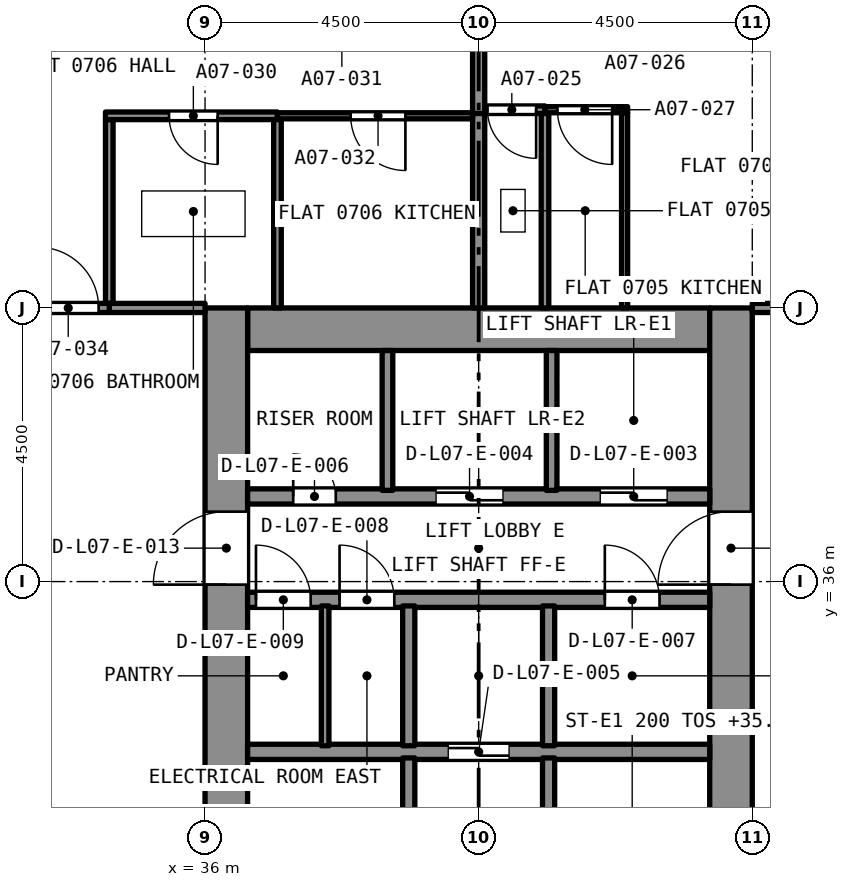
"""IFC4 building model, lengths in metres.
Left out: names, types, materials, properties, quantities, classifications, styles, units other than length and angle.
Written with IfcOpenShell. Run it as: python <this file> out.ifc"""

import sys

from ifc_helpers import new_model, si_unit, direction, frame, frame_2d, origin, place, context, subcontext, project, spatial, rectangle, extrude, element, fill, save


model = new_model("IFC4")
c1 = context("Model", 3, precision=1e-05, world=origin(), true_north=direction((0.0, 1.0)))
c2 = subcontext(c1, "Body", "Model", "MODEL_VIEW")
j1 = project(units=[si_unit("LENGTHUNIT", "METRE"), si_unit("PLANEANGLEUNIT", "RADIAN")], contexts=[c1])
p1 = place(None, origin())
s1 = spatial("IfcSite", under=j1, at=p1, CompositionType="ELEMENT")
p2 = place(p1, origin())
s2 = spatial("IfcBuilding", under=s1, at=p2, CompositionType="ELEMENT")
p3 = place(p2, frame((0.0, 0.0, 33.6)))
s3 = spatial("IfcBuildingStorey", under=s2, at=p3, CompositionType="ELEMENT", Elevation=33.6)
p4 = place(p3, frame((36.7, 40.15, 0.0), z_axis=(0.0, 0.0, 1.0), x_axis=(1.0, 0.0, 0.0)))
e1 = element("IfcWall", 1, at=p4, inside=s3, PredefinedType="SOLIDWALL", context=c2, shape_type="SweptSolid", body=[
    extrude(rectangle(XDim=7.6, YDim=0.7, at=frame_2d((3.8, 0.0))), origin(), (0.0, 0.0, 1.0), 3.2),
])
p5 = place(p3, frame((36.35, 27.0, 0.0), z_axis=(0.0, 0.0, 1.0), x_axis=(0.0, 1.0, 0.0)))
e2 = element("IfcWall", 2, at=p5, inside=s3, PredefinedType="SOLIDWALL", context=c2, shape_type="SweptSolid", body=[
    extrude(rectangle(XDim=13.5, YDim=0.7, at=frame_2d((6.75, 0.0))), origin(), (0.0, 0.0, 1.0), 3.2),
])
p6 = place(p5, frame((8.95, 0.0, 0.0)))
e3 = element("IfcOpeningElement", 3, at=p6, cuts=e2, PredefinedType="OPENING", context=c2, shape_type="SweptSolid", body=[
    extrude(rectangle(XDim=1.2, YDim=2.1, at=frame_2d((0.6, 1.05))), frame((0.0, 0.36, 0.0), z_axis=(0.0, -1.0, 0.0), x_axis=(1.0, 0.0, 0.0)), (0.0, 0.0, 1.0), 0.72),
])
p7 = place(p3, frame((44.65, 27.0, 0.0), z_axis=(0.0, 0.0, 1.0), x_axis=(0.0, 1.0, 0.0)))
e4 = element("IfcWall", 4, at=p7, inside=s3, PredefinedType="SOLIDWALL", context=c2, shape_type="SweptSolid", body=[
    extrude(rectangle(XDim=13.5, YDim=0.7, at=frame_2d((6.75, 0.0))), origin(), (0.0, 0.0, 1.0), 3.2),
])
p8 = place(p7, frame((8.95, 0.0, 0.0)))
e5 = element("IfcOpeningElement", 5, at=p8, cuts=e4, PredefinedType="OPENING", context=c2, shape_type="SweptSolid", body=[
    extrude(rectangle(XDim=1.2, YDim=2.1, at=frame_2d((0.6, 1.05))), frame((0.0, 0.36, 0.0), z_axis=(0.0, -1.0, 0.0), x_axis=(1.0, 0.0, 0.0)), (0.0, 0.0, 1.0), 0.72),
])
p9 = place(p3, frame((41.591, 43.76, 0.0), z_axis=(0.0, 0.0, 1.0), x_axis=(-1.0, 0.0, 0.0)))
e6 = element("IfcWall", 6, at=p9, inside=s3, PredefinedType="PARTITIONING", context=c2, shape_type="SweptSolid", body=[
    extrude(rectangle(XDim=0.991, YDim=0.125, at=frame_2d((0.495, 0.0))), origin(), (0.0, 0.0, 1.0), 2.9),
])
p10 = place(p9, frame((0.146, 0.0, 0.0)))
e7 = element("IfcOpeningElement", 7, at=p10, cuts=e6, PredefinedType="OPENING", context=c2, shape_type="SweptSolid", body=[
    extrude(rectangle(XDim=0.8, YDim=2.1, at=frame_2d((0.4, 1.05))), frame((0.0, 0.073, 0.0), z_axis=(0.0, -1.0, 0.0), x_axis=(1.0, 0.0, 0.0)), (0.0, 0.0, 1.0), 0.145),
])
p11 = place(p3, frame((41.591, 40.5, 0.0), z_axis=(0.0, 0.0, 1.0), x_axis=(0.0, 1.0, 0.0)))
e8 = element("IfcWall", 8, at=p11, inside=s3, PredefinedType="PARTITIONING", context=c2, shape_type="SweptSolid", body=[
    extrude(rectangle(XDim=3.198, YDim=0.125, at=frame_2d((1.599, 0.0))), origin(), (0.0, 0.0, 1.0), 2.9),
])
p12 = place(p3, frame((40.5, 40.5, 0.0), z_axis=(0.0, 0.0, 1.0), x_axis=(0.0, 1.0, 0.0)))
e9 = element("IfcWall", 9, at=p12, inside=s3, PredefinedType="PARTITIONING", context=c2, shape_type="SweptSolid", body=[
    extrude(rectangle(XDim=3.21, YDim=0.2, at=frame_2d((1.605, 0.0))), origin(), (0.0, 0.0, 1.0), 2.9),
])
p13 = place(p3, frame((42.9, 40.5, 0.0), z_axis=(0.0, 0.0, 1.0), x_axis=(0.0, 1.0, 0.0)))
e10 = element("IfcWall", 10, at=p13, inside=s3, PredefinedType="PARTITIONING", context=c2, shape_type="SweptSolid", body=[
    extrude(rectangle(XDim=3.21, YDim=0.1, at=frame_2d((1.605, 0.0))), origin(), (0.0, 0.0, 1.0), 2.9),
])
p14 = place(p3, frame((42.95, 43.76, 0.0), z_axis=(0.0, 0.0, 1.0), x_axis=(-1.0, 0.0, 0.0)))
e11 = element("IfcWall", 11, at=p14, inside=s3, PredefinedType="PARTITIONING", context=c2, shape_type="SweptSolid", body=[
    extrude(rectangle(XDim=1.359, YDim=0.1, at=frame_2d((0.68, 0.0))), origin(), (0.0, 0.0, 1.0), 2.9),
])
p15 = place(p14, frame((0.254, 0.0, 0.0)))
e12 = element("IfcOpeningElement", 12, at=p15, cuts=e11, PredefinedType="OPENING", context=c2, shape_type="SweptSolid", body=[
    extrude(rectangle(XDim=0.9, YDim=2.1, at=frame_2d((0.45, 1.05))), frame((0.0, 0.06, 0.0), z_axis=(0.0, -1.0, 0.0), x_axis=(1.0, 0.0, 0.0)), (0.0, 0.0, 1.0), 0.12),
])
p16 = place(p3, frame((40.5, 43.698, 0.0), z_axis=(0.0, 0.0, 1.0), x_axis=(0.0, 1.0, 0.0)))
e13 = element("IfcWall", 13, at=p16, inside=s3, PredefinedType="PARTITIONING", context=c2, shape_type="SweptSolid", body=[
    extrude(rectangle(XDim=1.292, YDim=0.2, at=frame_2d((0.646, 0.0))), origin(), (0.0, 0.0, 1.0), 2.9),
])
p17 = place(p3, frame((45.0, 40.5, 0.0), z_axis=(0.0, 0.0, 1.0), x_axis=(1.0, 0.0, 0.0)))
e14 = element("IfcWall", 14, at=p17, inside=s3, PredefinedType="PARTITIONING", context=c2, shape_type="SweptSolid", body=[
    extrude(rectangle(XDim=3.8, YDim=0.15, at=frame_2d((1.9, 0.0))), origin(), (0.0, 0.0, 1.0), 2.9),
])
p18 = place(p17, frame((1.75, 0.0, 0.0)))
e15 = element("IfcOpeningElement", 15, at=p18, cuts=e14, PredefinedType="OPENING", context=c2, shape_type="SweptSolid", body=[
    extrude(rectangle(XDim=1.0, YDim=2.1, at=frame_2d((0.5, 1.05))), frame((0.0, 0.085, 0.0), z_axis=(0.0, -1.0, 0.0), x_axis=(1.0, 0.0, 0.0)), (0.0, 0.0, 1.0), 0.17),
])
p19 = place(p3, frame((34.425, 40.575, 0.0), z_axis=(0.0, 0.0, 1.0), x_axis=(0.0, 1.0, 0.0)))
e16 = element("IfcWall", 16, at=p19, inside=s3, PredefinedType="PARTITIONING", context=c2, shape_type="SweptSolid", body=[
    extrude(rectangle(XDim=3.022, YDim=0.125, at=frame_2d((1.511, 0.0))), origin(), (0.0, 0.0, 1.0), 2.9),
])
p20 = place(p3, frame((37.19, 43.66, 0.0), z_axis=(0.0, 0.0, 1.0), x_axis=(-1.0, 0.0, 0.0)))
e17 = element("IfcWall", 17, at=p20, inside=s3, PredefinedType="PARTITIONING", context=c2, shape_type="SweptSolid", body=[
    extrude(rectangle(XDim=2.828, YDim=0.125, at=frame_2d((1.414, 0.0))), origin(), (0.0, 0.0, 1.0), 2.9),
])
p21 = place(p20, frame((0.983, 0.0, 0.0)))
e18 = element("IfcOpeningElement", 18, at=p21, cuts=e17, PredefinedType="OPENING", context=c2, shape_type="SweptSolid", body=[
    extrude(rectangle(XDim=0.8, YDim=2.1, at=frame_2d((0.4, 1.05))), frame((0.0, 0.073, 0.0), z_axis=(0.0, -1.0, 0.0), x_axis=(1.0, 0.0, 0.0)), (0.0, 0.0, 1.0), 0.145),
])
p22 = place(p3, frame((37.191, 40.5, 0.0), z_axis=(0.0, 0.0, 1.0), x_axis=(0.0, 1.0, 0.0)))
e19 = element("IfcWall", 19, at=p22, inside=s3, PredefinedType="PARTITIONING", context=c2, shape_type="SweptSolid", body=[
    extrude(rectangle(XDim=3.097, YDim=0.125, at=frame_2d((1.549, 0.0))), origin(), (0.0, 0.0, 1.0), 2.9),
])
p23 = place(p3, frame((34.425, 40.5, 0.0), z_axis=(0.0, 0.0, 1.0), x_axis=(1.0, 0.0, 0.0)))
e20 = element("IfcWall", 20, at=p23, inside=s3, PredefinedType="PARTITIONING", context=c2, shape_type="SweptSolid", body=[
    extrude(rectangle(XDim=1.575, YDim=0.15, at=frame_2d((0.788, 0.0))), origin(), (0.0, 0.0, 1.0), 2.9),
])
p24 = place(p3, frame((40.4, 43.66, 0.0), z_axis=(0.0, 0.0, 1.0), x_axis=(-1.0, 0.0, 0.0)))
e21 = element("IfcWall", 21, at=p24, inside=s3, PredefinedType="PARTITIONING", context=c2, shape_type="SweptSolid", body=[
    extrude(rectangle(XDim=3.209, YDim=0.1, at=frame_2d((1.605, 0.0))), origin(), (0.0, 0.0, 1.0), 2.9),
])
p25 = place(p24, frame((1.105, 0.0, 0.0)))
e22 = element("IfcOpeningElement", 22, at=p25, cuts=e21, PredefinedType="OPENING", context=c2, shape_type="SweptSolid", body=[
    extrude(rectangle(XDim=0.9, YDim=2.1, at=frame_2d((0.45, 1.05))), frame((0.0, 0.06, 0.0), z_axis=(0.0, -1.0, 0.0), x_axis=(1.0, 0.0, 0.0)), (0.0, 0.0, 1.0), 0.12),
])
p26 = place(p3, frame((32.2, 40.5, 0.0), z_axis=(0.0, 0.0, 1.0), x_axis=(1.0, 0.0, 0.0)))
e23 = element("IfcWall", 23, at=p26, inside=s3, PredefinedType="PARTITIONING", context=c2, shape_type="SweptSolid", body=[
    extrude(rectangle(XDim=2.225, YDim=0.15, at=frame_2d((1.113, 0.0))), origin(), (0.0, 0.0, 1.0), 2.9),
])
p27 = place(p26, frame((1.05, 0.0, 0.0)))
e24 = element("IfcOpeningElement", 24, at=p27, cuts=e23, PredefinedType="OPENING", context=c2, shape_type="SweptSolid", body=[
    extrude(rectangle(XDim=1.0, YDim=2.1, at=frame_2d((0.5, 1.05))), frame((0.0, 0.085, 0.0), z_axis=(0.0, -1.0, 0.0), x_axis=(1.0, 0.0, 0.0)), (0.0, 0.0, 1.0), 0.17),
])
p28 = place(p3, frame((36.7, 33.2, 0.0), z_axis=(0.0, 0.0, 1.0), x_axis=(1.0, 0.0, 0.0)))
e25 = element("IfcWall", 25, at=p28, inside=s3, PredefinedType="SOLIDWALL", context=c2, shape_type="SweptSolid", body=[
    extrude(rectangle(XDim=7.6, YDim=0.25, at=frame_2d((3.8, 0.0))), origin(), (0.0, 0.0, 1.0), 2.9),
])
p29 = place(p28, frame((3.3, 0.0, 0.0)))
e26 = element("IfcOpeningElement", 26, at=p29, cuts=e25, PredefinedType="OPENING", context=c2, shape_type="SweptSolid", body=[
    extrude(rectangle(XDim=1.0, YDim=2.1, at=frame_2d((0.5, 1.05))), frame((0.0, 0.135, 0.0), z_axis=(0.0, -1.0, 0.0), x_axis=(1.0, 0.0, 0.0)), (0.0, 0.0, 1.0), 0.27),
])
p30 = place(p3, frame((36.7, 35.7, 0.0), z_axis=(0.0, 0.0, 1.0), x_axis=(1.0, 0.0, 0.0)))
e27 = element("IfcWall", 27, at=p30, inside=s3, PredefinedType="SOLIDWALL", context=c2, shape_type="SweptSolid", body=[
    extrude(rectangle(XDim=7.6, YDim=0.25, at=frame_2d((3.8, 0.0))), origin(), (0.0, 0.0, 1.0), 2.9),
])
p31 = place(p30, frame((5.875, 0.0, 0.0)))
e28 = element("IfcOpeningElement", 28, at=p31, cuts=e27, PredefinedType="OPENING", context=c2, shape_type="SweptSolid", body=[
    extrude(rectangle(XDim=0.9, YDim=2.1, at=frame_2d((0.45, 1.05))), frame((0.0, 0.135, 0.0), z_axis=(0.0, -1.0, 0.0), x_axis=(1.0, 0.0, 0.0)), (0.0, 0.0, 1.0), 0.27),
])
p32 = place(p30, frame((1.512, 0.0, 0.0)))
e29 = element("IfcOpeningElement", 29, at=p32, cuts=e27, PredefinedType="OPENING", context=c2, shape_type="SweptSolid", body=[
    extrude(rectangle(XDim=0.9, YDim=2.1, at=frame_2d((0.45, 1.05))), frame((0.0, 0.135, 0.0), z_axis=(0.0, -1.0, 0.0), x_axis=(1.0, 0.0, 0.0)), (0.0, 0.0, 1.0), 0.27),
])
p33 = place(p30, frame((0.137, 0.0, 0.0)))
e30 = element("IfcOpeningElement", 30, at=p33, cuts=e27, PredefinedType="OPENING", context=c2, shape_type="SweptSolid", body=[
    extrude(rectangle(XDim=0.9, YDim=2.1, at=frame_2d((0.45, 1.05))), frame((0.0, 0.135, 0.0), z_axis=(0.0, -1.0, 0.0), x_axis=(1.0, 0.0, 0.0)), (0.0, 0.0, 1.0), 0.27),
])
p34 = place(p3, frame((36.7, 37.4, 0.0), z_axis=(0.0, 0.0, 1.0), x_axis=(1.0, 0.0, 0.0)))
e31 = element("IfcWall", 31, at=p34, inside=s3, PredefinedType="SOLIDWALL", context=c2, shape_type="SweptSolid", body=[
    extrude(rectangle(XDim=7.6, YDim=0.25, at=frame_2d((3.8, 0.0))), origin(), (0.0, 0.0, 1.0), 2.9),
])
p35 = place(p34, frame((5.8, 0.0, 0.0)))
e32 = element("IfcOpeningElement", 32, at=p35, cuts=e31, PredefinedType="OPENING", context=c2, shape_type="SweptSolid", body=[
    extrude(rectangle(XDim=1.1, YDim=2.4, at=frame_2d((0.55, 1.2))), frame((0.0, 0.135, 0.0), z_axis=(0.0, -1.0, 0.0), x_axis=(1.0, 0.0, 0.0)), (0.0, 0.0, 1.0), 0.27),
])
p36 = place(p34, frame((3.1, 0.0, 0.0)))
e33 = element("IfcOpeningElement", 33, at=p36, cuts=e31, PredefinedType="OPENING", context=c2, shape_type="SweptSolid", body=[
    extrude(rectangle(XDim=1.1, YDim=2.4, at=frame_2d((0.55, 1.2))), frame((0.0, 0.135, 0.0), z_axis=(0.0, -1.0, 0.0), x_axis=(1.0, 0.0, 0.0)), (0.0, 0.0, 1.0), 0.27),
])
p37 = place(p34, frame((0.75, 0.0, 0.0)))
e34 = element("IfcOpeningElement", 34, at=p37, cuts=e31, PredefinedType="OPENING", context=c2, shape_type="SweptSolid", body=[
    extrude(rectangle(XDim=0.7, YDim=2.1, at=frame_2d((0.35, 1.05))), frame((0.0, 0.135, 0.0), z_axis=(0.0, -1.0, 0.0), x_axis=(1.0, 0.0, 0.0)), (0.0, 0.0, 1.0), 0.27),
])
p38 = place(p3, frame((41.65, 27.7, 0.0), z_axis=(0.0, 0.0, 1.0), x_axis=(0.0, 1.0, 0.0)))
e35 = element("IfcWall", 35, at=p38, inside=s3, PredefinedType="SOLIDWALL", context=c2, shape_type="SweptSolid", body=[
    extrude(rectangle(XDim=5.4, YDim=0.2, at=frame_2d((2.7, 0.0))), origin(), (0.0, 0.0, 1.0), 2.9),
])
p39 = place(p38, frame((0.2, 0.0, 0.0)))
e36 = element("IfcOpeningElement", 36, at=p39, cuts=e35, PredefinedType="OPENING", context=c2, shape_type="SweptSolid", body=[
    extrude(rectangle(XDim=0.9, YDim=2.1, at=frame_2d((0.45, 1.05))), frame((0.0, 0.11, 0.0), z_axis=(0.0, -1.0, 0.0), x_axis=(1.0, 0.0, 0.0)), (0.0, 0.0, 1.0), 0.22),
])
p40 = place(p3, frame((39.35, 27.7, 0.0), z_axis=(0.0, 0.0, 1.0), x_axis=(0.0, 1.0, 0.0)))
e37 = element("IfcWall", 37, at=p40, inside=s3, PredefinedType="SOLIDWALL", context=c2, shape_type="SweptSolid", body=[
    extrude(rectangle(XDim=5.4, YDim=0.2, at=frame_2d((2.7, 0.0))), origin(), (0.0, 0.0, 1.0), 2.9),
])
p41 = place(p40, frame((0.2, 0.0, 0.0)))
e38 = element("IfcOpeningElement", 38, at=p41, cuts=e37, PredefinedType="OPENING", context=c2, shape_type="SweptSolid", body=[
    extrude(rectangle(XDim=0.9, YDim=2.1, at=frame_2d((0.45, 1.05))), frame((0.0, 0.11, 0.0), z_axis=(0.0, -1.0, 0.0), x_axis=(1.0, 0.0, 0.0)), (0.0, 0.0, 1.0), 0.22),
])
for number, where, z_axis, x_axis in (
    (39, (41.65, 33.3, 0.0), (0.0, 0.0, 1.0), (0.0, 1.0, 0.0)),
    (40, (39.35, 33.3, 0.0), (0.0, 0.0, 1.0), (0.0, 1.0, 0.0)),
):
    element("IfcWall", number, at=place(p3, frame(where, z_axis=z_axis, x_axis=x_axis)), inside=s3, PredefinedType="SOLIDWALL", context=c2, shape_type="SweptSolid", body=[
        extrude(rectangle(XDim=2.3, YDim=0.2, at=frame_2d((1.15, 0.0))), origin(), (0.0, 0.0, 1.0), 2.9),
    ])
for number, where, z_axis, x_axis in (
    (41, (41.7, 37.5, 0.0), (0.0, 0.0, 1.0), (0.0, 1.0, 0.0)),
    (42, (39.0, 37.5, 0.0), (0.0, 0.0, 1.0), (0.0, 1.0, 0.0)),
):
    element("IfcWall", number, at=place(p3, frame(where, z_axis=z_axis, x_axis=x_axis)), inside=s3, PredefinedType="SOLIDWALL", context=c2, shape_type="SweptSolid", body=[
        extrude(rectangle(XDim=2.3, YDim=0.175, at=frame_2d((1.15, 0.0))), origin(), (0.0, 0.0, 1.0), 2.9),
    ])
p42 = place(p3, frame((37.975, 33.3, 0.0), z_axis=(0.0, 0.0, 1.0), x_axis=(0.0, 1.0, 0.0)))
e43 = element("IfcWall", 43, at=p42, inside=s3, PredefinedType="PARTITIONING", context=c2, shape_type="SweptSolid", body=[
    extrude(rectangle(XDim=2.3, YDim=0.125, at=frame_2d((1.15, 0.0))), origin(), (0.0, 0.0, 1.0), 2.9),
])
p43 = place(p10, origin())
e44 = element("IfcDoor", 44, at=p43, inside=s3, OperationType="SINGLE_SWING_RIGHT", PredefinedType="DOOR", context=c2, shape_type="SweptSolid", body=[
    extrude(rectangle(XDim=0.8, YDim=2.1, at=frame_2d((0.4, 1.05))), frame((0.0, 0.025, 0.0), z_axis=(0.0, -1.0, 0.0), x_axis=(1.0, 0.0, 0.0)), (0.0, 0.0, 1.0), 0.05),
])
fill(e7, e44)
p44 = place(p15, origin())
e45 = element("IfcDoor", 45, at=p44, inside=s3, OperationType="SINGLE_SWING_RIGHT", PredefinedType="DOOR", context=c2, shape_type="SweptSolid", body=[
    extrude(rectangle(XDim=0.9, YDim=2.1, at=frame_2d((0.45, 1.05))), frame((0.0, 0.025, 0.0), z_axis=(0.0, -1.0, 0.0), x_axis=(1.0, 0.0, 0.0)), (0.0, 0.0, 1.0), 0.05),
])
fill(e12, e45)
p45 = place(p21, origin())
e46 = element("IfcDoor", 46, at=p45, inside=s3, OperationType="SINGLE_SWING_LEFT", PredefinedType="DOOR", context=c2, shape_type="SweptSolid", body=[
    extrude(rectangle(XDim=0.8, YDim=2.1, at=frame_2d((0.4, 1.05))), frame((0.0, 0.025, 0.0), z_axis=(0.0, -1.0, 0.0), x_axis=(1.0, 0.0, 0.0)), (0.0, 0.0, 1.0), 0.05),
])
fill(e18, e46)
p46 = place(p25, origin())
e47 = element("IfcDoor", 47, at=p46, inside=s3, OperationType="SINGLE_SWING_LEFT", PredefinedType="DOOR", context=c2, shape_type="SweptSolid", body=[
    extrude(rectangle(XDim=0.9, YDim=2.1, at=frame_2d((0.45, 1.05))), frame((0.0, 0.025, 0.0), z_axis=(0.0, -1.0, 0.0), x_axis=(1.0, 0.0, 0.0)), (0.0, 0.0, 1.0), 0.05),
])
fill(e22, e47)
p47 = place(p27, origin())
e48 = element("IfcDoor", 48, at=p47, inside=s3, OperationType="SINGLE_SWING_RIGHT", PredefinedType="DOOR", context=c2, shape_type="SweptSolid", body=[
    extrude(rectangle(XDim=1.0, YDim=2.1, at=frame_2d((0.5, 1.05))), frame((0.0, 0.025, 0.0), z_axis=(0.0, -1.0, 0.0), x_axis=(1.0, 0.0, 0.0)), (0.0, 0.0, 1.0), 0.05),
])
fill(e24, e48)
p48 = place(p35, origin())
e49 = element("IfcDoor", 49, at=p48, inside=s3, OperationType="SLIDING_TO_LEFT", PredefinedType="DOOR", context=c2, shape_type="SweptSolid", body=[
    extrude(rectangle(XDim=1.1, YDim=2.4, at=frame_2d((0.55, 1.2))), frame((0.0, 0.025, 0.0), z_axis=(0.0, -1.0, 0.0), x_axis=(1.0, 0.0, 0.0)), (0.0, 0.0, 1.0), 0.05),
])
fill(e32, e49)
p49 = place(p36, origin())
e50 = element("IfcDoor", 50, at=p49, inside=s3, OperationType="SLIDING_TO_LEFT", PredefinedType="DOOR", context=c2, shape_type="SweptSolid", body=[
    extrude(rectangle(XDim=1.1, YDim=2.4, at=frame_2d((0.55, 1.2))), frame((0.0, 0.025, 0.0), z_axis=(0.0, -1.0, 0.0), x_axis=(1.0, 0.0, 0.0)), (0.0, 0.0, 1.0), 0.05),
])
fill(e33, e50)
p50 = place(p29, origin())
e51 = element("IfcDoor", 51, at=p50, inside=s3, OperationType="SLIDING_TO_LEFT", PredefinedType="DOOR", context=c2, shape_type="SweptSolid", body=[
    extrude(rectangle(XDim=1.0, YDim=2.1, at=frame_2d((0.5, 1.05))), frame((0.0, 0.025, 0.0), z_axis=(0.0, -1.0, 0.0), x_axis=(1.0, 0.0, 0.0)), (0.0, 0.0, 1.0), 0.05),
])
fill(e26, e51)
p51 = place(p37, origin())
e52 = element("IfcDoor", 52, at=p51, inside=s3, OperationType="SINGLE_SWING_LEFT", PredefinedType="DOOR", context=c2, shape_type="SweptSolid", body=[
    extrude(rectangle(XDim=0.7, YDim=2.1, at=frame_2d((0.35, 1.05))), frame((0.0, 0.025, 0.0), z_axis=(0.0, -1.0, 0.0), x_axis=(1.0, 0.0, 0.0)), (0.0, 0.0, 1.0), 0.05),
])
fill(e34, e52)
p52 = place(p31, origin())
e53 = element("IfcDoor", 53, at=p52, inside=s3, OperationType="SINGLE_SWING_LEFT", PredefinedType="DOOR", context=c2, shape_type="SweptSolid", body=[
    extrude(rectangle(XDim=0.9, YDim=2.1, at=frame_2d((0.45, 1.05))), frame((0.0, 0.025, 0.0), z_axis=(0.0, -1.0, 0.0), x_axis=(1.0, 0.0, 0.0)), (0.0, 0.0, 1.0), 0.05),
])
fill(e28, e53)
p53 = place(p32, origin())
e54 = element("IfcDoor", 54, at=p53, inside=s3, OperationType="SINGLE_SWING_LEFT", PredefinedType="DOOR", context=c2, shape_type="SweptSolid", body=[
    extrude(rectangle(XDim=0.9, YDim=2.1, at=frame_2d((0.45, 1.05))), frame((0.0, 0.025, 0.0), z_axis=(0.0, -1.0, 0.0), x_axis=(1.0, 0.0, 0.0)), (0.0, 0.0, 1.0), 0.05),
])
fill(e29, e54)
p54 = place(p33, origin())
e55 = element("IfcDoor", 55, at=p54, inside=s3, OperationType="SINGLE_SWING_LEFT", PredefinedType="DOOR", context=c2, shape_type="SweptSolid", body=[
    extrude(rectangle(XDim=0.9, YDim=2.1, at=frame_2d((0.45, 1.05))), frame((0.0, 0.025, 0.0), z_axis=(0.0, -1.0, 0.0), x_axis=(1.0, 0.0, 0.0)), (0.0, 0.0, 1.0), 0.05),
])
fill(e30, e55)
p55 = place(p6, origin())
e56 = element("IfcDoor", 56, at=p55, inside=s3, OperationType="SINGLE_SWING_LEFT", PredefinedType="DOOR", context=c2, shape_type="SweptSolid", body=[
    extrude(rectangle(XDim=1.2, YDim=2.1, at=frame_2d((0.6, 1.05))), frame((0.0, 0.025, 0.0), z_axis=(0.0, -1.0, 0.0), x_axis=(1.0, 0.0, 0.0)), (0.0, 0.0, 1.0), 0.05),
])
fill(e3, e56)
p56 = place(p8, origin())
e57 = element("IfcDoor", 57, at=p56, inside=s3, OperationType="SINGLE_SWING_LEFT", PredefinedType="DOOR", context=c2, shape_type="SweptSolid", body=[
    extrude(rectangle(XDim=1.2, YDim=2.1, at=frame_2d((0.6, 1.05))), frame((0.0, 0.025, 0.0), z_axis=(0.0, -1.0, 0.0), x_axis=(1.0, 0.0, 0.0)), (0.0, 0.0, 1.0), 0.05),
])
fill(e5, e57)
save(model, sys.argv[1])
